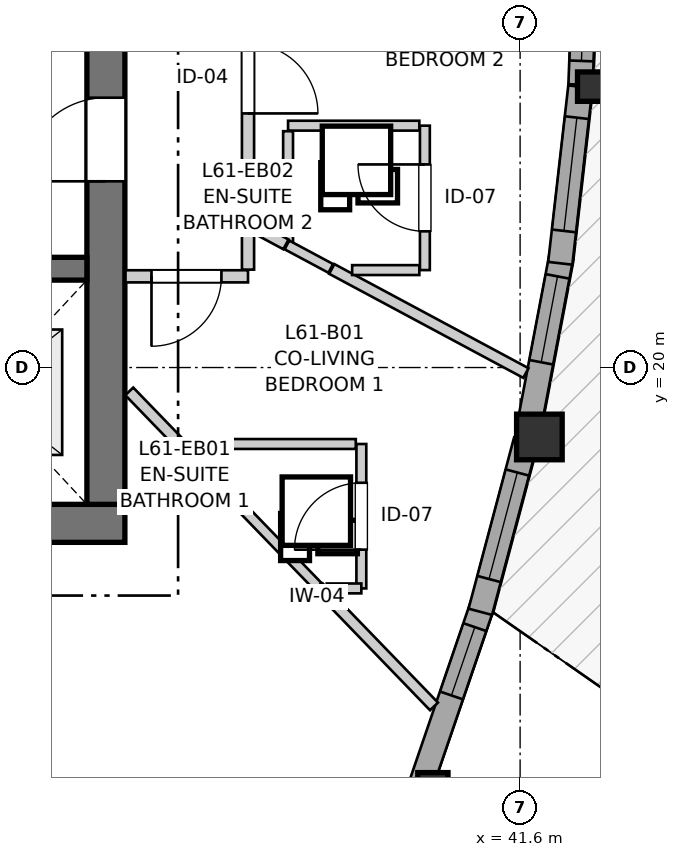
"""IFC4 building model, lengths in metres.
Left out: names, types, materials, properties, quantities, classifications, styles, units other than length and angle.
Written with IfcOpenShell. Run it as: python <this file> out.ifc"""

import sys

from ifc_helpers import new_model, si_unit, direction, frame, frame_2d, origin, origin_2d, place, context, subcontext, project, spatial, rectangle, i_section, extrude, source, transform, mapped, element, fill, save


model = new_model("IFC4")
c1 = context("Model", 3, precision=1e-05, world=origin(), true_north=direction((0.0, 1.0)))
c2 = subcontext(c1, "Body", "Model", "MODEL_VIEW")
j1 = project(units=[si_unit("LENGTHUNIT", "METRE"), si_unit("PLANEANGLEUNIT", "RADIAN")], contexts=[c1])
p1 = place(None, origin())
s1 = spatial("IfcSite", under=j1, at=p1, CompositionType="ELEMENT")
p2 = place(p1, origin())
s2 = spatial("IfcBuilding", under=s1, at=p2, CompositionType="ELEMENT")
p3 = place(p2, frame((0.0, 0.0, 205.2)))
s3 = spatial("IfcBuildingStorey", under=s2, at=p3, CompositionType="ELEMENT", Elevation=205.2)
p4 = place(p3, frame((24.3, 17.95, 0.0), z_axis=(0.0, 0.0, 1.0), x_axis=(1.0, 0.0, 0.0)))
e1 = element("IfcWall", 1, at=p4, inside=s3, PredefinedType="SHEAR", context=c2, shape_type="SweptSolid", body=[
    extrude(rectangle(XDim=12.1, YDim=0.5, at=frame_2d((6.05, 0.0))), origin(), (0.0, 0.0, 1.0), 2.935),
])
p5 = place(p3, frame((36.15, 18.2, 0.0), z_axis=(0.0, 0.0, 1.0), x_axis=(0.0, 1.0, 0.0)))
e2 = element("IfcWall", 2, at=p5, inside=s3, PredefinedType="SHEAR", context=c2, shape_type="SweptSolid", body=[
    extrude(rectangle(XDim=15.6, YDim=0.5, at=frame_2d((7.8, 0.0))), origin(), (0.0, 0.0, 1.0), 2.935),
])
p6 = place(p5, frame((4.25, 0.0, 0.0)))
e3 = element("IfcOpeningElement", 3, at=p6, cuts=e2, PredefinedType="OPENING", context=c2, shape_type="SweptSolid", body=[
    extrude(rectangle(XDim=1.1, YDim=2.15, at=frame_2d((0.55, 1.075))), frame((0.0, 0.26, 0.0), z_axis=(0.0, -1.0, 0.0), x_axis=(1.0, 0.0, 0.0)), (0.0, 0.0, 1.0), 0.52),
])
p7 = place(p5, frame((10.25, 0.0, 0.0)))
e4 = element("IfcOpeningElement", 4, at=p7, cuts=e2, PredefinedType="OPENING", context=c2, shape_type="SweptSolid", body=[
    extrude(rectangle(XDim=1.1, YDim=2.15, at=frame_2d((0.55, 1.075))), frame((0.0, 0.26, 0.0), z_axis=(0.0, -1.0, 0.0), x_axis=(1.0, 0.0, 0.0)), (0.0, 0.0, 1.0), 0.52),
])
p8 = place(p3, frame((24.8, 21.3, 0.0), z_axis=(0.0, 0.0, 1.0), x_axis=(1.0, 0.0, 0.0)))
e5 = element("IfcWall", 5, at=p8, inside=s3, PredefinedType="SHEAR", context=c2, shape_type="SweptSolid", body=[
    extrude(rectangle(XDim=11.1, YDim=0.3, at=frame_2d((5.55, 0.0))), origin(), (0.0, 0.0, 1.0), 2.935),
])
p9 = place(p8, frame((6.22, 0.0, 0.0)))
e6 = element("IfcOpeningElement", 6, at=p9, cuts=e5, PredefinedType="OPENING", context=c2, shape_type="SweptSolid", body=[
    extrude(rectangle(XDim=0.98, YDim=2.15, at=frame_2d((0.49, 1.075))), frame((0.0, 0.16, 0.0), z_axis=(0.0, -1.0, 0.0), x_axis=(1.0, 0.0, 0.0)), (0.0, 0.0, 1.0), 0.32),
])
p10 = place(p8, frame((9.15, 0.0, 0.0)))
e7 = element("IfcOpeningElement", 7, at=p10, cuts=e5, PredefinedType="OPENING", context=c2, shape_type="SweptSolid", body=[
    extrude(rectangle(XDim=1.15, YDim=2.15, at=frame_2d((0.575, 1.075))), frame((0.0, 0.16, 0.0), z_axis=(0.0, -1.0, 0.0), x_axis=(1.0, 0.0, 0.0)), (0.0, 0.0, 1.0), 0.32),
])
m1 = source(origin(), c2, "Body", "SweptSolid", [
    extrude(i_section(OverallWidth=0.398, OverallDepth=0.387, WebThickness=0.019, FlangeThickness=0.03, FilletRadius=0.015, at=origin_2d()), origin(), (0.0, 0.0, 1.0), 2.935),
])
p11 = place(p3, frame((40.452, 14.478, 0.0), z_axis=(0.0, 0.0, 1.0), x_axis=(1.0, 0.0, 0.0)))
e8 = element("IfcColumn", 8, at=p11, inside=s3, PredefinedType="PILASTER", context=c2, shape_type="MappedRepresentation", body=[
    mapped(m1, transform((0.0, 0.0, 0.0), x_axis=(1.0, 0.0, 0.0), y_axis=(0.0, 1.0, 0.0), z_axis=(0.0, 0.0, 1.0), scale=1.0)),
])
m2 = source(origin(), c2, "Body", "SweptSolid", [
    extrude(rectangle(XDim=0.6, YDim=0.6, at=origin_2d()), origin(), (0.0, 0.0, 1.0), 2.935),
])
p12 = place(p3, frame((41.854, 19.086, 0.0), z_axis=(0.0, 0.0, 1.0), x_axis=(1.0, 0.0, 0.0)))
e9 = element("IfcColumn", 9, at=p12, inside=s3, PredefinedType="COLUMN", context=c2, shape_type="MappedRepresentation", body=[
    mapped(m2, transform((0.0, 0.0, 0.0), x_axis=(1.0, 0.0, 0.0), y_axis=(0.0, 1.0, 0.0), z_axis=(0.0, 0.0, 1.0), scale=1.0)),
])
p13 = place(p3, frame((42.554, 23.696, 0.0), z_axis=(0.0, 0.0, 1.0), x_axis=(1.0, 0.0, 0.0)))
e10 = element("IfcColumn", 10, at=p13, inside=s3, PredefinedType="PILASTER", context=c2, shape_type="MappedRepresentation", body=[
    mapped(m1, transform((0.0, 0.0, 0.0), x_axis=(1.0, 0.0, 0.0), y_axis=(0.0, 1.0, 0.0), z_axis=(0.0, 0.0, 1.0), scale=1.0)),
])
p14 = place(p3, frame((40.308, 14.548, 0.0), z_axis=(0.0, 0.0, 1.0), x_axis=(0.323591564922, 0.946196860654, 0.0)))
e11 = element("IfcWall", 11, at=p14, inside=s3, PredefinedType="SOLIDWALL", context=c2, shape_type="SweptSolid", body=[
    extrude(rectangle(XDim=2.454, YDim=0.32, at=frame_2d((1.227, 0.0))), origin(), (0.0, 0.0, 1.0), 2.555),
])
p15 = place(p14, frame((1.202, 0.0, 0.82)))
e12 = element("IfcOpeningElement", 12, at=p15, cuts=e11, PredefinedType="OPENING", context=c2, shape_type="SweptSolid", body=[
    extrude(rectangle(XDim=0.95, YDim=1.35, at=frame_2d((0.475, 0.675))), frame((0.0, 0.17, 0.0), z_axis=(0.0, -1.0, 0.0), x_axis=(1.0, 0.0, 0.0)), (0.0, 0.0, 1.0), 0.34),
])
p16 = place(p3, frame((41.076, 16.786, 0.0), z_axis=(0.0, 0.0, 1.0), x_axis=(0.257037260973, 0.966401493413, 0.0)))
e13 = element("IfcWall", 13, at=p16, inside=s3, PredefinedType="SOLIDWALL", context=c2, shape_type="SweptSolid", body=[
    extrude(rectangle(XDim=2.333, YDim=0.32, at=frame_2d((1.167, 0.0))), origin(), (0.0, 0.0, 1.0), 2.555),
])
p17 = place(p16, frame((0.446, 0.0, 0.82)))
e14 = element("IfcOpeningElement", 14, at=p17, cuts=e13, PredefinedType="OPENING", context=c2, shape_type="SweptSolid", body=[
    extrude(rectangle(XDim=1.45, YDim=1.25, at=frame_2d((0.725, 0.625))), frame((0.0, 0.17, 0.0), z_axis=(0.0, -1.0, 0.0), x_axis=(1.0, 0.0, 0.0)), (0.0, 0.0, 1.0), 0.34),
])
p18 = place(p3, frame((41.713, 19.205, 0.0), z_axis=(0.0, 0.0, 1.0), x_axis=(0.186691464441, 0.982418595663, 0.0)))
e15 = element("IfcWall", 15, at=p18, inside=s3, PredefinedType="SOLIDWALL", context=c2, shape_type="SweptSolid", body=[
    extrude(rectangle(XDim=2.294, YDim=0.32, at=frame_2d((1.147, 0.0))), origin(), (0.0, 0.0, 1.0), 2.555),
])
p19 = place(p18, frame((0.88, 0.0, 0.82)))
e16 = element("IfcOpeningElement", 16, at=p19, cuts=e15, PredefinedType="OPENING", context=c2, shape_type="SweptSolid", body=[
    extrude(rectangle(XDim=1.15, YDim=1.2, at=frame_2d((0.575, 0.6))), frame((0.0, 0.17, 0.0), z_axis=(0.0, -1.0, 0.0), x_axis=(1.0, 0.0, 0.0)), (0.0, 0.0, 1.0), 0.34),
])
p20 = place(p3, frame((42.128, 21.371, 0.0), z_axis=(0.0, 0.0, 1.0), x_axis=(0.113319777802, 0.993558567956, 0.0)))
e17 = element("IfcWall", 17, at=p20, inside=s3, PredefinedType="SOLIDWALL", context=c2, shape_type="SweptSolid", body=[
    extrude(rectangle(XDim=2.338, YDim=0.32, at=frame_2d((1.169, 0.0))), origin(), (0.0, 0.0, 1.0), 2.555),
])
p21 = place(p20, frame((0.429, 0.0, 0.82)))
e18 = element("IfcOpeningElement", 18, at=p21, cuts=e17, PredefinedType="OPENING", context=c2, shape_type="SweptSolid", body=[
    extrude(rectangle(XDim=1.5, YDim=1.45, at=frame_2d((0.75, 0.725))), frame((0.0, 0.17, 0.0), z_axis=(0.0, -1.0, 0.0), x_axis=(1.0, 0.0, 0.0)), (0.0, 0.0, 1.0), 0.34),
])
p22 = place(p3, frame((42.395, 23.722, 0.0), z_axis=(0.0, 0.0, 1.0), x_axis=(0.038025668885, 0.999276762717, 0.0)))
e19 = element("IfcWall", 19, at=p22, inside=s3, PredefinedType="SOLIDWALL", context=c2, shape_type="SweptSolid", body=[
    extrude(rectangle(XDim=2.324, YDim=0.32, at=frame_2d((1.162, 0.0))), origin(), (0.0, 0.0, 1.0), 2.555),
])
p23 = place(p22, frame((0.312, 0.0, 0.82)))
e20 = element("IfcOpeningElement", 20, at=p23, cuts=e19, PredefinedType="OPENING", context=c2, shape_type="SweptSolid", body=[
    extrude(rectangle(XDim=1.35, YDim=1.45, at=frame_2d((0.675, 0.725))), frame((0.0, 0.17, 0.0), z_axis=(0.0, -1.0, 0.0), x_axis=(1.0, 0.0, 0.0)), (0.0, 0.0, 1.0), 0.34),
])
p24 = place(p3, frame((38.02, 25.733, 0.0), z_axis=(0.0, 0.0, 1.0), x_axis=(0.0, -1.0, 0.0)))
e21 = element("IfcWall", 21, at=p24, inside=s3, PredefinedType="PARTITIONING", context=c2, shape_type="SweptSolid", body=[
    extrude(rectangle(XDim=3.862, YDim=0.16, at=frame_2d((1.931, 0.0))), origin(), (0.0, 0.0, 1.0), 2.935),
])
p25 = place(p24, frame((1.47, 0.0, 0.0)))
e22 = element("IfcOpeningElement", 22, at=p25, cuts=e21, PredefinedType="OPENING", context=c2, shape_type="SweptSolid", body=[
    extrude(rectangle(XDim=0.92, YDim=2.1, at=frame_2d((0.46, 1.05))), frame((0.0, 0.09, 0.0), z_axis=(0.0, -1.0, 0.0), x_axis=(1.0, 0.0, 0.0)), (0.0, 0.0, 1.0), 0.18),
])
p26 = place(p3, frame((39.511, 17.094, 0.0), z_axis=(0.0, 0.0, 1.0), x_axis=(0.0, 1.0, 0.0)))
e23 = element("IfcWall", 23, at=p26, inside=s3, PredefinedType="PARTITIONING", context=c2, shape_type="SweptSolid", body=[
    extrude(rectangle(XDim=1.9, YDim=0.13, at=frame_2d((0.95, 0.0))), origin(), (0.0, 0.0, 1.0), 2.935),
])
p27 = place(p26, frame((0.51, 0.0, 0.0)))
e24 = element("IfcOpeningElement", 24, at=p27, cuts=e23, PredefinedType="OPENING", context=c2, shape_type="SweptSolid", body=[
    extrude(rectangle(XDim=0.88, YDim=2.05, at=frame_2d((0.44, 1.025))), frame((0.0, 0.075, 0.0), z_axis=(0.0, -1.0, 0.0), x_axis=(1.0, 0.0, 0.0)), (0.0, 0.0, 1.0), 0.15),
])
p28 = place(p3, frame((40.347, 21.282, 0.0), z_axis=(0.0, 0.0, 1.0), x_axis=(0.0, 1.0, 0.0)))
e25 = element("IfcWall", 25, at=p28, inside=s3, PredefinedType="PARTITIONING", context=c2, shape_type="SweptSolid", body=[
    extrude(rectangle(XDim=1.9, YDim=0.13, at=frame_2d((0.95, 0.0))), origin(), (0.0, 0.0, 1.0), 2.573),
])
p29 = place(p28, frame((0.51, 0.0, 0.0)))
e26 = element("IfcOpeningElement", 26, at=p29, cuts=e25, PredefinedType="OPENING", context=c2, shape_type="SweptSolid", body=[
    extrude(rectangle(XDim=0.88, YDim=2.05, at=frame_2d((0.44, 1.025))), frame((0.0, 0.075, 0.0), z_axis=(0.0, -1.0, 0.0), x_axis=(1.0, 0.0, 0.0)), (0.0, 0.0, 1.0), 0.15),
])
p30 = place(p3, frame((38.02, 21.2, 0.0), z_axis=(0.0, 0.0, 1.0), x_axis=(-1.0, 0.0, 0.0)))
e27 = element("IfcWall", 27, at=p30, inside=s3, PredefinedType="PARTITIONING", context=c2, shape_type="SweptSolid", body=[
    extrude(rectangle(XDim=1.612, YDim=0.16, at=frame_2d((0.806, 0.0))), origin(), (0.0, 0.0, 1.0), 2.935),
])
p31 = place(p30, frame((0.35, 0.0, 0.0)))
e28 = element("IfcOpeningElement", 28, at=p31, cuts=e27, PredefinedType="OPENING", context=c2, shape_type="SweptSolid", body=[
    extrude(rectangle(XDim=0.92, YDim=2.1, at=frame_2d((0.46, 1.05))), frame((0.0, 0.09, 0.0), z_axis=(0.0, -1.0, 0.0), x_axis=(1.0, 0.0, 0.0)), (0.0, 0.0, 1.0), 0.18),
])
p32 = place(p3, frame((39.122, 21.297, 0.0), z_axis=(0.0, 0.0, 1.0), x_axis=(0.881308328415, -0.472541670402, 0.0)))
e29 = element("IfcWall", 29, at=p32, inside=s3, PredefinedType="PARTITIONING", context=c2, shape_type="SweptSolid", body=[
    extrude(rectangle(XDim=2.898, YDim=0.145, at=frame_2d((1.449, 0.0))), origin(), (0.0, 0.0, 1.0), 2.935),
])
p33 = place(p3, frame((38.951, 17.109, 0.0), z_axis=(0.0, 0.0, 1.0), x_axis=(0.695195716836, -0.718820502833, 0.0)))
e30 = element("IfcWall", 30, at=p33, inside=s3, PredefinedType="PARTITIONING", context=c2, shape_type="SweptSolid", body=[
    extrude(rectangle(XDim=2.18, YDim=0.145, at=frame_2d((1.09, 0.0))), origin(), (0.0, 0.0, 1.0), 2.935),
])
p34 = place(p3, frame((36.458, 19.686, 0.0), z_axis=(0.0, 0.0, 1.0), x_axis=(0.695231916786, -0.718785490868, 0.0)))
e31 = element("IfcWall", 31, at=p34, inside=s3, PredefinedType="PARTITIONING", context=c2, shape_type="SweptSolid", body=[
    extrude(rectangle(XDim=1.824, YDim=0.145, at=frame_2d((0.912, 0.0))), origin(), (0.0, 0.0, 1.0), 2.935),
])
p35 = place(p3, frame((37.711, 18.994, 0.0), z_axis=(0.0, 0.0, 1.0), x_axis=(1.0, 0.0, 0.0)))
e32 = element("IfcWall", 32, at=p35, inside=s3, PredefinedType="PARTITIONING", context=c2, shape_type="SweptSolid", body=[
    extrude(rectangle(XDim=1.727, YDim=0.13, at=frame_2d((0.864, 0.0))), origin(), (0.0, 0.0, 1.0), 2.935),
])
p36 = place(p3, frame((38.547, 23.182, 0.0), z_axis=(0.0, 0.0, 1.0), x_axis=(1.0, 0.0, 0.0)))
e33 = element("IfcWall", 33, at=p36, inside=s3, PredefinedType="PARTITIONING", context=c2, shape_type="SweptSolid", body=[
    extrude(rectangle(XDim=1.727, YDim=0.13, at=frame_2d((0.863, 0.0))), origin(), (0.0, 0.0, 1.0), 2.935),
])
p37 = place(p3, frame((37.736, 18.364, 0.0), z_axis=(0.0, 0.0, 1.0), x_axis=(0.695451956037, -0.718572596781, 0.0)))
e34 = element("IfcWall", 34, at=p37, inside=s3, PredefinedType="PARTITIONING", context=c2, shape_type="SweptSolid", body=[
    extrude(rectangle(XDim=1.732, YDim=0.13, at=frame_2d((0.866, 0.0))), origin(), (0.0, 0.0, 1.0), 2.935),
])
p38 = place(p3, frame((38.547, 21.605, 0.0), z_axis=(0.0, 0.0, 1.0), x_axis=(0.0, 1.0, 0.0)))
e35 = element("IfcWall", 35, at=p38, inside=s3, PredefinedType="PARTITIONING", context=c2, shape_type="SweptSolid", body=[
    extrude(rectangle(XDim=1.504, YDim=0.13, at=frame_2d((0.752, 0.0))), origin(), (0.0, 0.0, 1.0), 2.603),
])
p39 = place(p3, frame((39.39, 21.282, 0.0), z_axis=(0.0, 0.0, 1.0), x_axis=(1.0, 0.0, 0.0)))
e36 = element("IfcWall", 36, at=p39, inside=s3, PredefinedType="PARTITIONING", context=c2, shape_type="SweptSolid", body=[
    extrude(rectangle(XDim=0.884, YDim=0.13, at=frame_2d((0.442, 0.0))), origin(), (0.0, 0.0, 1.0), 2.935),
])
p40 = place(p3, frame((38.02, 21.288, 0.0), z_axis=(0.0, 0.0, 1.0), x_axis=(0.0, 1.0, 0.0)))
e37 = element("IfcWall", 37, at=p40, inside=s3, PredefinedType="PARTITIONING", context=c2, shape_type="SweptSolid", body=[
    extrude(rectangle(XDim=0.568, YDim=0.16, at=frame_2d((0.284, 0.0))), origin(), (0.0, 0.0, 1.0), 2.935),
])
p41 = place(p3, frame((38.532, 21.613, 0.0), z_axis=(0.0, 0.0, 1.0), x_axis=(0.881618593919, -0.471962556626, 0.0)))
e38 = element("IfcWall", 38, at=p41, inside=s3, PredefinedType="PARTITIONING", context=c2, shape_type="SweptSolid", body=[
    extrude(rectangle(XDim=0.654, YDim=0.13, at=frame_2d((0.327, 0.0))), origin(), (0.0, 0.0, 1.0), 2.935),
])
p42 = place(p3, frame((37.711, 18.571, 0.0), z_axis=(0.0, 0.0, 1.0), x_axis=(0.0, 1.0, 0.0)))
e39 = element("IfcWall", 39, at=p42, inside=s3, PredefinedType="PARTITIONING", context=c2, shape_type="SweptSolid", body=[
    extrude(rectangle(XDim=0.35, YDim=0.13, at=frame_2d((0.175, 0.0))), origin(), (0.0, 0.0, 1.0), 2.935),
])
p43 = place(p3, frame((38.06, 21.867, 0.0), z_axis=(0.0, 0.0, 1.0), x_axis=(0.881026965879, -0.473066047601, 0.0)))
e40 = element("IfcWall", 40, at=p43, inside=s3, PredefinedType="PARTITIONING", context=c2, shape_type="SweptSolid", body=[
    extrude(rectangle(XDim=0.521, YDim=0.145, at=frame_2d((0.261, 0.0))), origin(), (0.0, 0.0, 1.0), 2.935),
])
p44 = place(p3, frame((39.056, 17.094, 0.0), z_axis=(0.0, 0.0, 1.0), x_axis=(1.0, 0.0, 0.0)))
e41 = element("IfcWall", 41, at=p44, inside=s3, PredefinedType="PARTITIONING", context=c2, shape_type="SweptSolid", body=[
    extrude(rectangle(XDim=0.455, YDim=0.13, at=frame_2d((0.228, 0.0))), origin(), (0.0, 0.0, 1.0), 2.935),
])
m3 = source(origin(), c2, "Body", "SweptSolid", [
    extrude(rectangle(XDim=0.95, YDim=1.35, at=frame_2d((0.475, 0.675))), frame((0.0, 0.03, 0.0), z_axis=(0.0, -1.0, 0.0), x_axis=(1.0, 0.0, 0.0)), (0.0, 0.0, 1.0), 0.06),
])
p45 = place(p15, origin())
e42 = element("IfcWindow", 42, at=p45, inside=s3, PartitioningType="SINGLE_PANEL", PredefinedType="WINDOW", context=c2, shape_type="MappedRepresentation", body=[
    mapped(m3, transform((0.0, 0.0, 0.0), x_axis=(1.0, 0.0, 0.0), y_axis=(0.0, 1.0, 0.0), z_axis=(0.0, 0.0, 1.0), scale=1.0)),
])
fill(e12, e42)
m4 = source(origin(), c2, "Body", "SweptSolid", [
    extrude(rectangle(XDim=1.45, YDim=1.25, at=frame_2d((0.725, 0.625))), frame((0.0, 0.03, 0.0), z_axis=(0.0, -1.0, 0.0), x_axis=(1.0, 0.0, 0.0)), (0.0, 0.0, 1.0), 0.06),
])
p46 = place(p17, origin())
e43 = element("IfcWindow", 43, at=p46, inside=s3, PartitioningType="SINGLE_PANEL", PredefinedType="WINDOW", context=c2, shape_type="MappedRepresentation", body=[
    mapped(m4, transform((0.0, 0.0, 0.0), x_axis=(1.0, 0.0, 0.0), y_axis=(0.0, 1.0, 0.0), z_axis=(0.0, 0.0, 1.0), scale=1.0)),
])
fill(e14, e43)
m5 = source(origin(), c2, "Body", "SweptSolid", [
    extrude(rectangle(XDim=1.15, YDim=1.2, at=frame_2d((0.575, 0.6))), frame((0.0, 0.03, 0.0), z_axis=(0.0, -1.0, 0.0), x_axis=(1.0, 0.0, 0.0)), (0.0, 0.0, 1.0), 0.06),
])
p47 = place(p19, origin())
e44 = element("IfcWindow", 44, at=p47, inside=s3, PartitioningType="SINGLE_PANEL", PredefinedType="WINDOW", context=c2, shape_type="MappedRepresentation", body=[
    mapped(m5, transform((0.0, 0.0, 0.0), x_axis=(1.0, 0.0, 0.0), y_axis=(0.0, 1.0, 0.0), z_axis=(0.0, 0.0, 1.0), scale=1.0)),
])
fill(e16, e44)
m6 = source(origin(), c2, "Body", "SweptSolid", [
    extrude(rectangle(XDim=1.5, YDim=1.45, at=frame_2d((0.75, 0.725))), frame((0.0, 0.03, 0.0), z_axis=(0.0, -1.0, 0.0), x_axis=(1.0, 0.0, 0.0)), (0.0, 0.0, 1.0), 0.06),
])
p48 = place(p21, origin())
e45 = element("IfcWindow", 45, at=p48, inside=s3, PartitioningType="SINGLE_PANEL", PredefinedType="WINDOW", context=c2, shape_type="MappedRepresentation", body=[
    mapped(m6, transform((0.0, 0.0, 0.0), x_axis=(1.0, 0.0, 0.0), y_axis=(0.0, 1.0, 0.0), z_axis=(0.0, 0.0, 1.0), scale=1.0)),
])
fill(e18, e45)
m7 = source(origin(), c2, "Body", "SweptSolid", [
    extrude(rectangle(XDim=1.35, YDim=1.45, at=frame_2d((0.675, 0.725))), frame((0.0, 0.03, 0.0), z_axis=(0.0, -1.0, 0.0), x_axis=(1.0, 0.0, 0.0)), (0.0, 0.0, 1.0), 0.06),
])
p49 = place(p23, origin())
e46 = element("IfcWindow", 46, at=p49, inside=s3, PartitioningType="SINGLE_PANEL", PredefinedType="WINDOW", context=c2, shape_type="MappedRepresentation", body=[
    mapped(m7, transform((0.0, 0.0, 0.0), x_axis=(1.0, 0.0, 0.0), y_axis=(0.0, 1.0, 0.0), z_axis=(0.0, 0.0, 1.0), scale=1.0)),
])
fill(e20, e46)
m8 = source(origin(), c2, "Body", "SweptSolid", [
    extrude(rectangle(XDim=1.1, YDim=2.15, at=frame_2d((0.55, 1.075))), frame((0.0, 0.025, 0.0), z_axis=(0.0, -1.0, 0.0), x_axis=(1.0, 0.0, 0.0)), (0.0, 0.0, 1.0), 0.05),
])
p50 = place(p6, origin())
e47 = element("IfcDoor", 47, at=p50, inside=s3, OperationType="SINGLE_SWING_LEFT", PredefinedType="DOOR", context=c2, shape_type="MappedRepresentation", body=[
    mapped(m8, transform((0.0, 0.0, 0.0), x_axis=(1.0, 0.0, 0.0), y_axis=(0.0, 1.0, 0.0), z_axis=(0.0, 0.0, 1.0), scale=1.0)),
])
fill(e3, e47)
m9 = source(origin(), c2, "Body", "SweptSolid", [
    extrude(rectangle(XDim=0.92, YDim=2.1, at=frame_2d((0.46, 1.05))), frame((0.0, 0.025, 0.0), z_axis=(0.0, -1.0, 0.0), x_axis=(1.0, 0.0, 0.0)), (0.0, 0.0, 1.0), 0.05),
])
p51 = place(p25, origin())
e48 = element("IfcDoor", 48, at=p51, inside=s3, OperationType="SINGLE_SWING_RIGHT", PredefinedType="DOOR", context=c2, shape_type="MappedRepresentation", body=[
    mapped(m9, transform((0.0, 0.0, 0.0), x_axis=(1.0, 0.0, 0.0), y_axis=(0.0, 1.0, 0.0), z_axis=(0.0, 0.0, 1.0), scale=1.0)),
])
fill(e22, e48)
m10 = source(origin(), c2, "Body", "SweptSolid", [
    extrude(rectangle(XDim=0.88, YDim=2.05, at=frame_2d((0.44, 1.025))), frame((0.0, 0.025, 0.0), z_axis=(0.0, -1.0, 0.0), x_axis=(1.0, 0.0, 0.0)), (0.0, 0.0, 1.0), 0.05),
])
p52 = place(p27, origin())
e49 = element("IfcDoor", 49, at=p52, inside=s3, OperationType="SINGLE_SWING_LEFT", PredefinedType="DOOR", context=c2, shape_type="MappedRepresentation", body=[
    mapped(m10, transform((0.0, 0.0, 0.0), x_axis=(1.0, 0.0, 0.0), y_axis=(0.0, 1.0, 0.0), z_axis=(0.0, 0.0, 1.0), scale=1.0)),
])
fill(e24, e49)
p53 = place(p29, origin())
e50 = element("IfcDoor", 50, at=p53, inside=s3, OperationType="SINGLE_SWING_RIGHT", PredefinedType="DOOR", context=c2, shape_type="MappedRepresentation", body=[
    mapped(m10, transform((0.0, 0.0, 0.0), x_axis=(1.0, 0.0, 0.0), y_axis=(0.0, 1.0, 0.0), z_axis=(0.0, 0.0, 1.0), scale=1.0)),
])
fill(e26, e50)
p54 = place(p31, origin())
e51 = element("IfcDoor", 51, at=p54, inside=s3, OperationType="SINGLE_SWING_RIGHT", PredefinedType="DOOR", context=c2, shape_type="MappedRepresentation", body=[
    mapped(m9, transform((0.0, 0.0, 0.0), x_axis=(1.0, 0.0, 0.0), y_axis=(0.0, 1.0, 0.0), z_axis=(0.0, 0.0, 1.0), scale=1.0)),
])
fill(e28, e51)
save(model, sys.argv[1])
